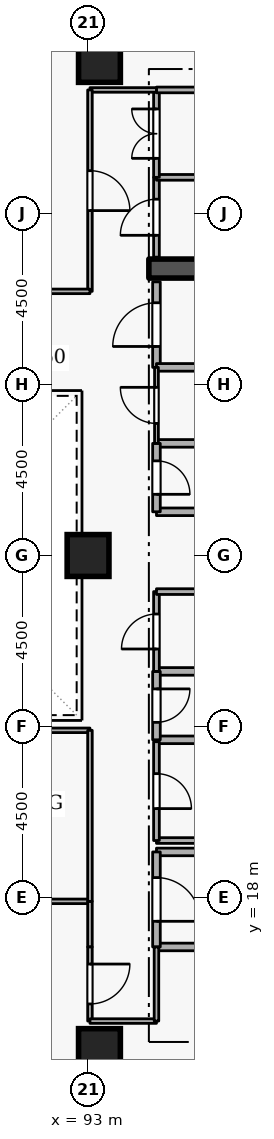
"""IFC4 building model, lengths in metres.
Left out: names, types, materials, properties, quantities, classifications, styles, units other than length and angle.
Written with IfcOpenShell. Run it as: python <this file> out.ifc"""

import sys

from ifc_helpers import new_model, si_unit, direction, frame, frame_2d, origin, origin_2d, place, context, subcontext, project, spatial, rectangle, extrude, element, fill, save


model = new_model("IFC4")
c1 = context("Model", 3, precision=1e-05, world=origin(), true_north=direction((0.0, 1.0)))
c2 = subcontext(c1, "Body", "Model", "MODEL_VIEW")
j1 = project(units=[si_unit("LENGTHUNIT", "METRE"), si_unit("PLANEANGLEUNIT", "RADIAN")], contexts=[c1])
p1 = place(None, origin())
s1 = spatial("IfcSite", under=j1, at=p1, CompositionType="ELEMENT")
p2 = place(p1, origin())
s2 = spatial("IfcBuilding", under=s1, at=p2, CompositionType="ELEMENT")
p3 = place(p2, frame((0.0, 0.0, 163.5)))
s3 = spatial("IfcBuildingStorey", under=s2, at=p3, CompositionType="ELEMENT", Elevation=163.5)
p4 = place(p3, frame((94.6, 34.55, 0.0), z_axis=(0.0, 0.0, 1.0), x_axis=(1.0, 0.0, 0.0)))
e1 = element("IfcWall", 1, at=p4, inside=s3, PredefinedType="SHEAR", context=c2, shape_type="SweptSolid", body=[
    extrude(rectangle(XDim=5.8, YDim=0.5, at=frame_2d((2.9, 0.0))), origin(), (0.0, 0.0, 1.0), 3.6),
])
for number, where, z_axis, x_axis in (
    (2, (93.3, 14.0, 0.0), (0.0, 0.0, 1.0), (1.0, 0.0, 0.0)),
    (3, (93.3, 40.0, 0.0), (0.0, 0.0, 1.0), (1.0, 0.0, 0.0)),
    (4, (93.0, 27.0, 0.0), (0.0, 0.0, 1.0), (1.0, 0.0, 0.0)),
):
    element("IfcColumn", number, at=place(p3, frame(where, z_axis=z_axis, x_axis=x_axis)), inside=s3, PredefinedType="COLUMN", context=c2, shape_type="SweptSolid", body=[
        extrude(rectangle(XDim=1.1, YDim=1.1, at=origin_2d()), origin(), (0.0, 0.0, 1.0), 3.6),
    ])
p5 = place(p3, frame((94.8, 16.7, 0.0), z_axis=(0.0, 0.0, 1.0), x_axis=(1.0, 0.0, 0.0)))
e5 = element("IfcWall", 5, at=p5, inside=s3, PredefinedType="STANDARD", context=c2, shape_type="SweptSolid", body=[
    extrude(rectangle(XDim=5.7, YDim=0.2, at=frame_2d((2.85, 0.0))), origin(), (0.0, 0.0, 1.0), 3.34),
])
p6 = place(p3, frame((97.1, 19.2, 0.0), z_axis=(0.0, 0.0, 1.0), x_axis=(-1.0, 0.0, 0.0)))
e6 = element("IfcWall", 6, at=p6, inside=s3, PredefinedType="STANDARD", context=c2, shape_type="SweptSolid", body=[
    extrude(rectangle(XDim=2.3, YDim=0.2, at=frame_2d((1.15, 0.0))), origin(), (0.0, 0.0, 1.0), 2.545),
])
p7 = place(p3, frame((94.8, 19.2, 0.0), z_axis=(0.0, 0.0, 1.0), x_axis=(0.0, -1.0, 0.0)))
e7 = element("IfcWall", 7, at=p7, inside=s3, PredefinedType="STANDARD", context=c2, shape_type="SweptSolid", body=[
    extrude(rectangle(XDim=2.5, YDim=0.2, at=frame_2d((1.25, 0.0))), origin(), (0.0, 0.0, 1.0), 3.34),
])
p8 = place(p7, frame((0.675, 0.0, 0.0)))
e8 = element("IfcOpeningElement", 8, at=p8, cuts=e7, PredefinedType="OPENING", context=c2, shape_type="SweptSolid", body=[
    extrude(rectangle(XDim=1.15, YDim=2.1, at=frame_2d((0.575, 1.05))), frame((0.0, 0.11, 0.0), z_axis=(0.0, -1.0, 0.0), x_axis=(1.0, 0.0, 0.0)), (0.0, 0.0, 1.0), 0.22),
])
for number, where, z_axis, x_axis in (
    (9, (94.8, 28.15, 0.0), (0.0, 0.0, 1.0), (1.0, 0.0, 0.0)),
    (10, (96.85, 29.95, 0.0), (0.0, 0.0, 1.0), (-1.0, 0.0, 0.0)),
):
    element("IfcWall", number, at=place(p3, frame(where, z_axis=z_axis, x_axis=x_axis)), inside=s3, PredefinedType="STANDARD", context=c2, shape_type="SweptSolid", body=[
        extrude(rectangle(XDim=2.05, YDim=0.2, at=frame_2d((1.025, 0.0))), origin(), (0.0, 0.0, 1.0), 3.34),
    ])
p9 = place(p3, frame((94.8, 29.95, 0.0), z_axis=(0.0, 0.0, 1.0), x_axis=(0.0, -1.0, 0.0)))
e11 = element("IfcWall", 11, at=p9, inside=s3, PredefinedType="STANDARD", context=c2, shape_type="SweptSolid", body=[
    extrude(rectangle(XDim=1.8, YDim=0.2, at=frame_2d((0.9, 0.0))), origin(), (0.0, 0.0, 1.0), 3.34),
])
p10 = place(p9, frame((0.46, 0.0, 0.0)))
e12 = element("IfcOpeningElement", 12, at=p10, cuts=e11, PredefinedType="OPENING", context=c2, shape_type="SweptSolid", body=[
    extrude(rectangle(XDim=0.88, YDim=2.04, at=frame_2d((0.44, 1.02))), frame((0.0, 0.11, 0.0), z_axis=(0.0, -1.0, 0.0), x_axis=(1.0, 0.0, 0.0)), (0.0, 0.0, 1.0), 0.22),
])
for number, where, z_axis, x_axis in (
    (13, (94.8, 22.15, 0.0), (0.0, 0.0, 1.0), (1.0, 0.0, 0.0)),
    (14, (96.85, 23.95, 0.0), (0.0, 0.0, 1.0), (-1.0, 0.0, 0.0)),
):
    element("IfcWall", number, at=place(p3, frame(where, z_axis=z_axis, x_axis=x_axis)), inside=s3, PredefinedType="STANDARD", context=c2, shape_type="SweptSolid", body=[
        extrude(rectangle(XDim=2.05, YDim=0.2, at=frame_2d((1.025, 0.0))), origin(), (0.0, 0.0, 1.0), 3.34),
    ])
p11 = place(p3, frame((94.8, 23.95, 0.0), z_axis=(0.0, 0.0, 1.0), x_axis=(0.0, -1.0, 0.0)))
e15 = element("IfcWall", 15, at=p11, inside=s3, PredefinedType="STANDARD", context=c2, shape_type="SweptSolid", body=[
    extrude(rectangle(XDim=1.8, YDim=0.2, at=frame_2d((0.9, 0.0))), origin(), (0.0, 0.0, 1.0), 3.34),
])
p12 = place(p11, frame((0.46, 0.0, 0.0)))
e16 = element("IfcOpeningElement", 16, at=p12, cuts=e15, PredefinedType="OPENING", context=c2, shape_type="SweptSolid", body=[
    extrude(rectangle(XDim=0.88, YDim=2.04, at=frame_2d((0.44, 1.02))), frame((0.0, 0.11, 0.0), z_axis=(0.0, -1.0, 0.0), x_axis=(1.0, 0.0, 0.0)), (0.0, 0.0, 1.0), 0.22),
])
p13 = place(p3, frame((94.8, 31.95, 0.0), z_axis=(0.0, 0.0, 1.0), x_axis=(0.0, 1.0, 0.0)))
e17 = element("IfcWall", 17, at=p13, inside=s3, PredefinedType="STANDARD", context=c2, shape_type="SweptSolid", body=[
    extrude(rectangle(XDim=2.25, YDim=0.2, at=frame_2d((1.125, 0.0))), origin(), (0.0, 0.0, 1.0), 3.34),
])
p14 = place(p13, frame((0.55, 0.0, 0.0)))
e18 = element("IfcOpeningElement", 18, at=p14, cuts=e17, PredefinedType="OPENING", context=c2, shape_type="SweptSolid", body=[
    extrude(rectangle(XDim=1.15, YDim=2.1, at=frame_2d((0.575, 1.05))), frame((0.0, 0.11, 0.0), z_axis=(0.0, -1.0, 0.0), x_axis=(1.0, 0.0, 0.0)), (0.0, 0.0, 1.0), 0.22),
])
p15 = place(p3, frame((96.85, 31.95, 0.0), z_axis=(0.0, 0.0, 1.0), x_axis=(-1.0, 0.0, 0.0)))
e19 = element("IfcWall", 19, at=p15, inside=s3, PredefinedType="STANDARD", context=c2, shape_type="SweptSolid", body=[
    extrude(rectangle(XDim=2.05, YDim=0.2, at=frame_2d((1.025, 0.0))), origin(), (0.0, 0.0, 1.0), 3.34),
])
p16 = place(p3, frame((94.8, 19.5, 0.0), z_axis=(0.0, 0.0, 1.0), x_axis=(1.0, 0.0, 0.0)))
e20 = element("IfcWall", 20, at=p16, inside=s3, PredefinedType="PARTITIONING", context=c2, shape_type="SweptSolid", body=[
    extrude(rectangle(XDim=2.05, YDim=0.15, at=frame_2d((1.025, 0.0))), origin(), (0.0, 0.0, 1.0), 2.545),
])
p17 = place(p3, frame((94.8, 22.1, 0.0), z_axis=(0.0, 0.0, 1.0), x_axis=(0.0, -1.0, 0.0)))
e21 = element("IfcWall", 21, at=p17, inside=s3, PredefinedType="PARTITIONING", context=c2, shape_type="SweptSolid", body=[
    extrude(rectangle(XDim=2.6, YDim=0.15, at=frame_2d((1.3, 0.0))), origin(), (0.0, 0.0, 1.0), 3.34),
])
p18 = place(p17, frame((0.84, 0.0, 0.0)))
e22 = element("IfcOpeningElement", 22, at=p18, cuts=e21, PredefinedType="OPENING", context=c2, shape_type="SweptSolid", body=[
    extrude(rectangle(XDim=0.92, YDim=2.08, at=frame_2d((0.46, 1.04))), frame((0.0, 0.085, 0.0), z_axis=(0.0, -1.0, 0.0), x_axis=(1.0, 0.0, 0.0)), (0.0, 0.0, 1.0), 0.17),
])
p19 = place(p3, frame((94.8, 23.95, 0.0), z_axis=(0.0, 0.0, 1.0), x_axis=(0.0, 1.0, 0.0)))
e23 = element("IfcWall", 23, at=p19, inside=s3, PredefinedType="PARTITIONING", context=c2, shape_type="SweptSolid", body=[
    extrude(rectangle(XDim=2.1, YDim=0.15, at=frame_2d((1.05, 0.0))), origin(), (0.0, 0.0, 1.0), 3.34),
])
p20 = place(p19, frame((0.59, 0.0, 0.0)))
e24 = element("IfcOpeningElement", 24, at=p20, cuts=e23, PredefinedType="OPENING", context=c2, shape_type="SweptSolid", body=[
    extrude(rectangle(XDim=0.92, YDim=2.08, at=frame_2d((0.46, 1.04))), frame((0.0, 0.085, 0.0), z_axis=(0.0, -1.0, 0.0), x_axis=(1.0, 0.0, 0.0)), (0.0, 0.0, 1.0), 0.17),
])
p21 = place(p3, frame((94.8, 26.05, 0.0), z_axis=(0.0, 0.0, 1.0), x_axis=(1.0, 0.0, 0.0)))
e25 = element("IfcWall", 25, at=p21, inside=s3, PredefinedType="PARTITIONING", context=c2, shape_type="SweptSolid", body=[
    extrude(rectangle(XDim=2.05, YDim=0.15, at=frame_2d((1.025, 0.0))), origin(), (0.0, 0.0, 1.0), 3.34),
])
p22 = place(p3, frame((94.8, 29.95, 0.0), z_axis=(0.0, 0.0, 1.0), x_axis=(0.0, 1.0, 0.0)))
e26 = element("IfcWall", 26, at=p22, inside=s3, PredefinedType="PARTITIONING", context=c2, shape_type="SweptSolid", body=[
    extrude(rectangle(XDim=2.0, YDim=0.1, at=frame_2d((1.0, 0.0))), origin(), (0.0, 0.0, 1.0), 3.34),
])
p23 = place(p22, frame((0.525, 0.0, 0.0)))
e27 = element("IfcOpeningElement", 27, at=p23, cuts=e26, PredefinedType="OPENING", context=c2, shape_type="SweptSolid", body=[
    extrude(rectangle(XDim=0.95, YDim=2.1, at=frame_2d((0.475, 1.05))), frame((0.0, 0.06, 0.0), z_axis=(0.0, -1.0, 0.0), x_axis=(1.0, 0.0, 0.0)), (0.0, 0.0, 1.0), 0.12),
])
p24 = place(p3, frame((94.8, 34.85, 0.0), z_axis=(0.0, 0.0, 1.0), x_axis=(0.0, 1.0, 0.0)))
e28 = element("IfcWall", 28, at=p24, inside=s3, PredefinedType="PARTITIONING", context=c2, shape_type="SweptSolid", body=[
    extrude(rectangle(XDim=2.1, YDim=0.15, at=frame_2d((1.05, 0.0))), origin(), (0.0, 0.0, 1.0), 3.34),
])
p25 = place(p24, frame((0.575, 0.0, 0.0)))
e29 = element("IfcOpeningElement", 29, at=p25, cuts=e28, PredefinedType="OPENING", context=c2, shape_type="SweptSolid", body=[
    extrude(rectangle(XDim=0.95, YDim=2.1, at=frame_2d((0.475, 1.05))), frame((0.0, 0.085, 0.0), z_axis=(0.0, -1.0, 0.0), x_axis=(1.0, 0.0, 0.0)), (0.0, 0.0, 1.0), 0.17),
])
p26 = place(p3, frame((94.8, 36.95, 0.0), z_axis=(0.0, 0.0, 1.0), x_axis=(1.0, 0.0, 0.0)))
e30 = element("IfcWall", 30, at=p26, inside=s3, PredefinedType="PARTITIONING", context=c2, shape_type="SweptSolid", body=[
    extrude(rectangle(XDim=5.65, YDim=0.15, at=frame_2d((2.825, 0.0))), origin(), (0.0, 0.0, 1.0), 3.34),
])
p27 = place(p3, frame((94.8, 36.95, 0.0), z_axis=(0.0, 0.0, 1.0), x_axis=(0.0, 1.0, 0.0)))
e31 = element("IfcWall", 31, at=p27, inside=s3, PredefinedType="PARTITIONING", context=c2, shape_type="SweptSolid", body=[
    extrude(rectangle(XDim=2.3, YDim=0.15, at=frame_2d((1.15, 0.0))), origin(), (0.0, 0.0, 1.0), 3.34),
])
p28 = place(p27, frame((0.5, 0.0, 0.0)))
e32 = element("IfcOpeningElement", 32, at=p28, cuts=e31, PredefinedType="OPENING", context=c2, shape_type="SweptSolid", body=[
    extrude(rectangle(XDim=1.3, YDim=2.12, at=frame_2d((0.65, 1.06))), frame((0.0, 0.085, 0.0), z_axis=(0.0, -1.0, 0.0), x_axis=(1.0, 0.0, 0.0)), (0.0, 0.0, 1.0), 0.17),
])
p29 = place(p3, frame((94.8, 39.25, 0.0), z_axis=(0.0, 0.0, 1.0), x_axis=(1.0, 0.0, 0.0)))
e33 = element("IfcWall", 33, at=p29, inside=s3, PredefinedType="PARTITIONING", context=c2, shape_type="SweptSolid", body=[
    extrude(rectangle(XDim=5.65, YDim=0.15, at=frame_2d((2.825, 0.0))), origin(), (0.0, 0.0, 1.0), 3.34),
])
p30 = place(p3, frame((88.5, 17.9, 0.0), z_axis=(0.0, 0.0, 1.0), x_axis=(1.0, 0.0, 0.0)))
e34 = element("IfcWall", 34, at=p30, inside=s3, PredefinedType="PARTITIONING", context=c2, shape_type="SweptSolid", body=[
    extrude(rectangle(XDim=4.55, YDim=0.12, at=frame_2d((2.275, 0.0))), origin(), (0.0, 0.0, 1.0), 3.34),
])
p31 = place(p3, frame((93.05, 17.9, 0.0), z_axis=(0.0, 0.0, 1.0), x_axis=(0.0, -1.0, 0.0)))
e35 = element("IfcWall", 35, at=p31, inside=s3, PredefinedType="PARTITIONING", context=c2, shape_type="SweptSolid", body=[
    extrude(rectangle(XDim=1.2, YDim=0.12, at=frame_2d((0.6, 0.0))), origin(), (0.0, 0.0, 1.0), 3.34),
])
p32 = place(p3, frame((93.05, 16.7, 0.0), z_axis=(0.0, 0.0, 1.0), x_axis=(0.0, -1.0, 0.0)))
e36 = element("IfcWall", 36, at=p32, inside=s3, PredefinedType="PARTITIONING", context=c2, shape_type="SweptSolid", body=[
    extrude(rectangle(XDim=1.95, YDim=0.12, at=frame_2d((0.975, 0.0))), origin(), (0.0, 0.0, 1.0), 3.34),
])
p33 = place(p32, frame((0.45, 0.0, 0.0)))
e37 = element("IfcOpeningElement", 37, at=p33, cuts=e36, PredefinedType="OPENING", context=c2, shape_type="SweptSolid", body=[
    extrude(rectangle(XDim=1.05, YDim=2.1, at=frame_2d((0.525, 1.05))), frame((0.0, 0.07, 0.0), z_axis=(0.0, -1.0, 0.0), x_axis=(1.0, 0.0, 0.0)), (0.0, 0.0, 1.0), 0.14),
])
p34 = place(p3, frame((93.05, 14.75, 0.0), z_axis=(0.0, 0.0, 1.0), x_axis=(1.0, 0.0, 0.0)))
e38 = element("IfcWall", 38, at=p34, inside=s3, PredefinedType="PARTITIONING", context=c2, shape_type="SweptSolid", body=[
    extrude(rectangle(XDim=1.75, YDim=0.12, at=frame_2d((0.875, 0.0))), origin(), (0.0, 0.0, 1.0), 3.34),
])
p35 = place(p3, frame((94.8, 14.75, 0.0), z_axis=(0.0, 0.0, 1.0), x_axis=(0.0, 1.0, 0.0)))
e39 = element("IfcWall", 39, at=p35, inside=s3, PredefinedType="PARTITIONING", context=c2, shape_type="SweptSolid", body=[
    extrude(rectangle(XDim=1.95, YDim=0.12, at=frame_2d((0.975, 0.0))), origin(), (0.0, 0.0, 1.0), 3.34),
])
p36 = place(p3, frame((83.95, 22.4, 0.0), z_axis=(0.0, 0.0, 1.0), x_axis=(1.0, 0.0, 0.0)))
e40 = element("IfcWall", 40, at=p36, inside=s3, PredefinedType="PARTITIONING", context=c2, shape_type="SweptSolid", body=[
    extrude(rectangle(XDim=9.1, YDim=0.12, at=frame_2d((4.55, 0.0))), origin(), (0.0, 0.0, 1.0), 3.34),
])
p37 = place(p3, frame((93.05, 22.4, 0.0), z_axis=(0.0, 0.0, 1.0), x_axis=(0.0, -1.0, 0.0)))
e41 = element("IfcWall", 41, at=p37, inside=s3, PredefinedType="PARTITIONING", context=c2, shape_type="SweptSolid", body=[
    extrude(rectangle(XDim=4.5, YDim=0.12, at=frame_2d((2.25, 0.0))), origin(), (0.0, 0.0, 1.0), 3.34),
])
p38 = place(p3, frame((94.8, 39.25, 0.0), z_axis=(0.0, 0.0, 1.0), x_axis=(-1.0, 0.0, 0.0)))
e42 = element("IfcWall", 42, at=p38, inside=s3, PredefinedType="PARTITIONING", context=c2, shape_type="SweptSolid", body=[
    extrude(rectangle(XDim=1.75, YDim=0.12, at=frame_2d((0.875, 0.0))), origin(), (0.0, 0.0, 1.0), 3.34),
])
p39 = place(p3, frame((93.05, 39.25, 0.0), z_axis=(0.0, 0.0, 1.0), x_axis=(0.0, -1.0, 0.0)))
e43 = element("IfcWall", 43, at=p39, inside=s3, PredefinedType="PARTITIONING", context=c2, shape_type="SweptSolid", body=[
    extrude(rectangle(XDim=5.3, YDim=0.12, at=frame_2d((2.65, 0.0))), origin(), (0.0, 0.0, 1.0), 3.34),
])
p40 = place(p39, frame((2.125, 0.0, 0.0)))
e44 = element("IfcOpeningElement", 44, at=p40, cuts=e43, PredefinedType="OPENING", context=c2, shape_type="SweptSolid", body=[
    extrude(rectangle(XDim=1.05, YDim=2.1, at=frame_2d((0.525, 1.05))), frame((0.0, 0.07, 0.0), z_axis=(0.0, -1.0, 0.0), x_axis=(1.0, 0.0, 0.0)), (0.0, 0.0, 1.0), 0.14),
])
p41 = place(p3, frame((93.05, 33.95, 0.0), z_axis=(0.0, 0.0, 1.0), x_axis=(-1.0, 0.0, 0.0)))
e45 = element("IfcWall", 45, at=p41, inside=s3, PredefinedType="PARTITIONING", context=c2, shape_type="SweptSolid", body=[
    extrude(rectangle(XDim=2.95, YDim=0.12, at=frame_2d((1.475, 0.0))), origin(), (0.0, 0.0, 1.0), 3.34),
])
p42 = place(p8, origin())
e46 = element("IfcDoor", 46, at=p42, inside=s3, OperationType="SINGLE_SWING_RIGHT", PredefinedType="DOOR", context=c2, shape_type="SweptSolid", body=[
    extrude(rectangle(XDim=1.15, YDim=2.1, at=frame_2d((0.575, 1.05))), frame((0.0, 0.025, 0.0), z_axis=(0.0, -1.0, 0.0), x_axis=(1.0, 0.0, 0.0)), (0.0, 0.0, 1.0), 0.05),
])
fill(e8, e46)
p43 = place(p10, origin())
e47 = element("IfcDoor", 47, at=p43, inside=s3, OperationType="SINGLE_SWING_RIGHT", PredefinedType="DOOR", context=c2, shape_type="SweptSolid", body=[
    extrude(rectangle(XDim=0.88, YDim=2.04, at=frame_2d((0.44, 1.02))), frame((0.0, 0.025, 0.0), z_axis=(0.0, -1.0, 0.0), x_axis=(1.0, 0.0, 0.0)), (0.0, 0.0, 1.0), 0.05),
])
fill(e12, e47)
p44 = place(p12, origin())
e48 = element("IfcDoor", 48, at=p44, inside=s3, OperationType="SINGLE_SWING_LEFT", PredefinedType="DOOR", context=c2, shape_type="SweptSolid", body=[
    extrude(rectangle(XDim=0.88, YDim=2.04, at=frame_2d((0.44, 1.02))), frame((0.0, 0.025, 0.0), z_axis=(0.0, -1.0, 0.0), x_axis=(1.0, 0.0, 0.0)), (0.0, 0.0, 1.0), 0.05),
])
fill(e16, e48)
p45 = place(p18, origin())
e49 = element("IfcDoor", 49, at=p45, inside=s3, OperationType="SINGLE_SWING_RIGHT", PredefinedType="DOOR", context=c2, shape_type="SweptSolid", body=[
    extrude(rectangle(XDim=0.92, YDim=2.08, at=frame_2d((0.46, 1.04))), frame((0.0, 0.025, 0.0), z_axis=(0.0, -1.0, 0.0), x_axis=(1.0, 0.0, 0.0)), (0.0, 0.0, 1.0), 0.05),
])
fill(e22, e49)
p46 = place(p20, origin())
e50 = element("IfcDoor", 50, at=p46, inside=s3, OperationType="SINGLE_SWING_LEFT", PredefinedType="DOOR", context=c2, shape_type="SweptSolid", body=[
    extrude(rectangle(XDim=0.92, YDim=2.08, at=frame_2d((0.46, 1.04))), frame((0.0, 0.025, 0.0), z_axis=(0.0, -1.0, 0.0), x_axis=(1.0, 0.0, 0.0)), (0.0, 0.0, 1.0), 0.05),
])
fill(e24, e50)
p47 = place(p23, origin())
e51 = element("IfcDoor", 51, at=p47, inside=s3, OperationType="SINGLE_SWING_RIGHT", PredefinedType="DOOR", context=c2, shape_type="SweptSolid", body=[
    extrude(rectangle(XDim=0.95, YDim=2.1, at=frame_2d((0.475, 1.05))), frame((0.0, 0.025, 0.0), z_axis=(0.0, -1.0, 0.0), x_axis=(1.0, 0.0, 0.0)), (0.0, 0.0, 1.0), 0.05),
])
fill(e27, e51)
p48 = place(p14, origin())
e52 = element("IfcDoor", 52, at=p48, inside=s3, OperationType="SINGLE_SWING_LEFT", PredefinedType="DOOR", context=c2, shape_type="SweptSolid", body=[
    extrude(rectangle(XDim=1.15, YDim=2.1, at=frame_2d((0.575, 1.05))), frame((0.0, 0.025, 0.0), z_axis=(0.0, -1.0, 0.0), x_axis=(1.0, 0.0, 0.0)), (0.0, 0.0, 1.0), 0.05),
])
fill(e18, e52)
p49 = place(p25, origin())
e53 = element("IfcDoor", 53, at=p49, inside=s3, OperationType="SINGLE_SWING_LEFT", PredefinedType="DOOR", context=c2, shape_type="SweptSolid", body=[
    extrude(rectangle(XDim=0.95, YDim=2.1, at=frame_2d((0.475, 1.05))), frame((0.0, 0.025, 0.0), z_axis=(0.0, -1.0, 0.0), x_axis=(1.0, 0.0, 0.0)), (0.0, 0.0, 1.0), 0.05),
])
fill(e29, e53)
p50 = place(p28, origin())
e54 = element("IfcDoor", 54, at=p50, inside=s3, OperationType="DOUBLE_DOOR_SINGLE_SWING", PredefinedType="DOOR", context=c2, shape_type="SweptSolid", body=[
    extrude(rectangle(XDim=1.3, YDim=2.12, at=frame_2d((0.65, 1.06))), frame((0.0, 0.025, 0.0), z_axis=(0.0, -1.0, 0.0), x_axis=(1.0, 0.0, 0.0)), (0.0, 0.0, 1.0), 0.05),
])
fill(e32, e54)
p51 = place(p33, origin())
e55 = element("IfcDoor", 55, at=p51, inside=s3, OperationType="SINGLE_SWING_LEFT", PredefinedType="DOOR", context=c2, shape_type="SweptSolid", body=[
    extrude(rectangle(XDim=1.05, YDim=2.1, at=frame_2d((0.525, 1.05))), frame((0.0, 0.025, 0.0), z_axis=(0.0, -1.0, 0.0), x_axis=(1.0, 0.0, 0.0)), (0.0, 0.0, 1.0), 0.05),
])
fill(e37, e55)
p52 = place(p40, origin())
e56 = element("IfcDoor", 56, at=p52, inside=s3, OperationType="SINGLE_SWING_RIGHT", PredefinedType="DOOR", context=c2, shape_type="SweptSolid", body=[
    extrude(rectangle(XDim=1.05, YDim=2.1, at=frame_2d((0.525, 1.05))), frame((0.0, 0.025, 0.0), z_axis=(0.0, -1.0, 0.0), x_axis=(1.0, 0.0, 0.0)), (0.0, 0.0, 1.0), 0.05),
])
fill(e44, e56)
save(model, sys.argv[1])
